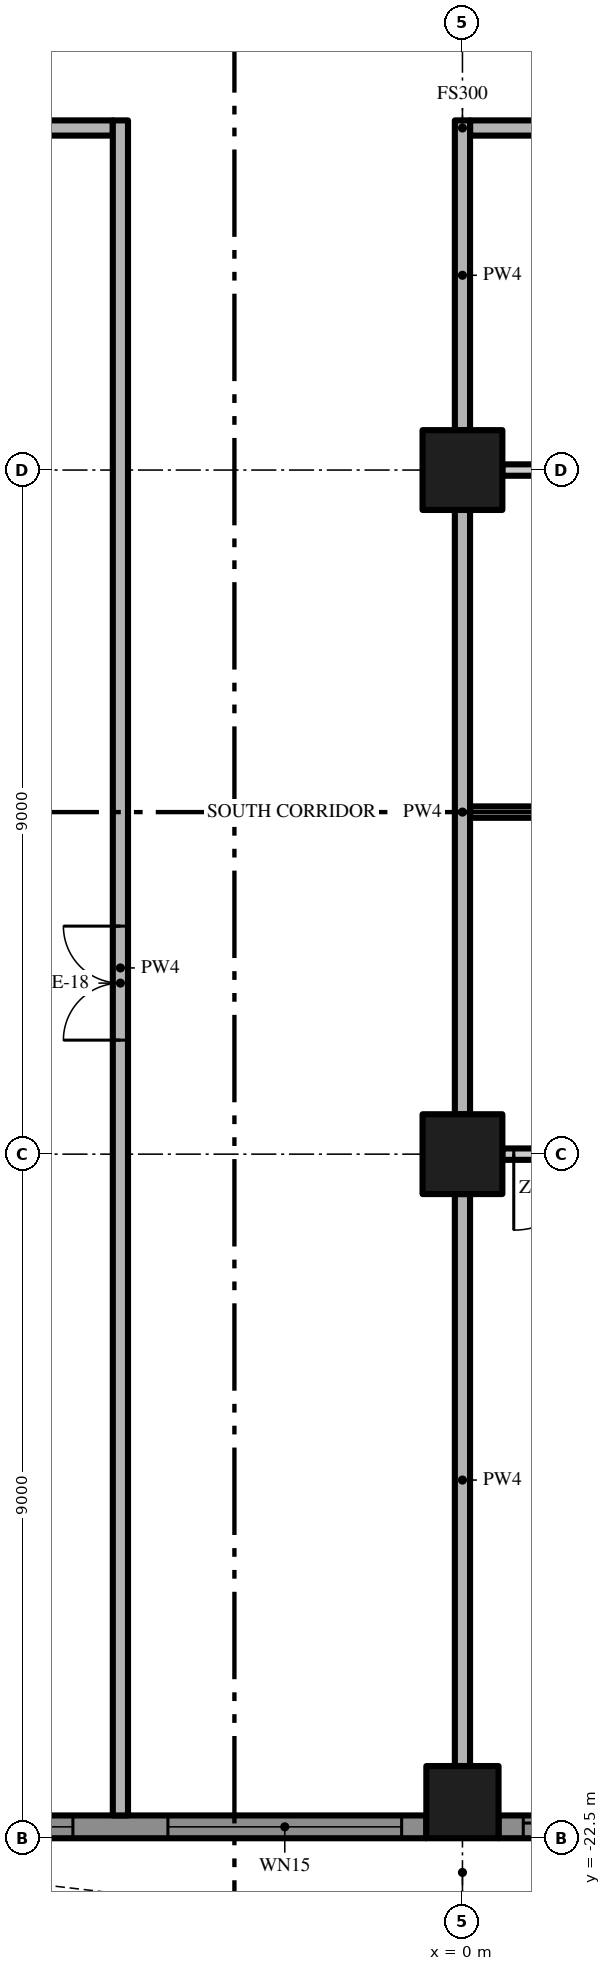
"""IFC4 building model, lengths in metres.
Left out: names, types, materials, properties, quantities, classifications, styles, units other than length and angle.
Written with IfcOpenShell. Run it as: python <this file> out.ifc"""

import sys

from ifc_helpers import new_model, si_unit, direction, frame, frame_2d, origin, origin_2d, place, context, subcontext, project, spatial, polyline, rectangle, outline, extrude, element, fill, save


model = new_model("IFC4")
c1 = context("Model", 3, precision=1e-05, world=origin(), true_north=direction((0.0, 1.0)))
c2 = subcontext(c1, "Body", "Model", "MODEL_VIEW")
j1 = project(units=[si_unit("LENGTHUNIT", "METRE"), si_unit("PLANEANGLEUNIT", "RADIAN")], contexts=[c1])
p1 = place(None, origin())
s1 = spatial("IfcSite", under=j1, at=p1, CompositionType="ELEMENT")
p2 = place(p1, origin())
s2 = spatial("IfcBuilding", under=s1, at=p2, CompositionType="ELEMENT")
p3 = place(p2, frame((0.0, 0.0, 230.0)))
s3 = spatial("IfcBuildingStorey", under=s2, at=p3, CompositionType="ELEMENT", Elevation=230.0)
p4 = place(p3, frame((0.0, -13.5, 0.0), z_axis=(0.0, 0.0, 1.0), x_axis=(1.0, 0.0, 0.0)))
e1 = element("IfcColumn", 1, at=p4, inside=s3, PredefinedType="COLUMN", context=c2, shape_type="SweptSolid", body=[
    extrude(rectangle(XDim=1.05, YDim=1.05, at=origin_2d()), origin(), (0.0, 0.0, 1.0), 3.5),
])
p5 = place(p3, frame((0.0, -22.025, 0.0), z_axis=(0.0, 0.0, 1.0), x_axis=(1.0, 0.0, 0.0)))
e2 = element("IfcColumn", 2, at=p5, inside=s3, PredefinedType="COLUMN", context=c2, shape_type="SweptSolid", body=[
    extrude(rectangle(XDim=0.95, YDim=0.95, at=origin_2d()), origin(), (0.0, 0.0, 1.0), 3.5),
])
p6 = place(p3, frame((0.0, -4.5, 0.0), z_axis=(0.0, 0.0, 1.0), x_axis=(1.0, 0.0, 0.0)))
e3 = element("IfcColumn", 3, at=p6, inside=s3, PredefinedType="COLUMN", context=c2, shape_type="SweptSolid", body=[
    extrude(rectangle(XDim=1.05, YDim=1.05, at=origin_2d()), origin(), (0.0, 0.0, 1.0), 3.5),
])
p7 = place(p3, frame((-0.475, -22.35, 0.0), z_axis=(0.0, 0.0, 1.0), x_axis=(-1.0, 0.0, 0.0)))
e4 = element("IfcWall", 4, at=p7, inside=s3, PredefinedType="SOLIDWALL", context=c2, shape_type="SweptSolid", body=[
    extrude(rectangle(XDim=8.05, YDim=0.3, at=frame_2d((4.025, 0.0))), origin(), (0.0, 0.0, 1.0), 3.5),
])
p8 = place(p7, frame((4.65, 0.0, 0.45)))
e5 = element("IfcOpeningElement", 5, at=p8, cuts=e4, PredefinedType="OPENING", context=c2, shape_type="SweptSolid", body=[
    extrude(rectangle(XDim=3.075, YDim=2.65, at=frame_2d((1.538, 1.325))), frame((0.0, 0.16, 0.0), z_axis=(0.0, -1.0, 0.0), x_axis=(1.0, 0.0, 0.0)), (0.0, 0.0, 1.0), 0.32),
])
p9 = place(p7, frame((0.325, 0.0, 0.45)))
e6 = element("IfcOpeningElement", 6, at=p9, cuts=e4, PredefinedType="OPENING", context=c2, shape_type="SweptSolid", body=[
    extrude(rectangle(XDim=3.075, YDim=2.65, at=frame_2d((1.538, 1.325))), frame((0.0, 0.16, 0.0), z_axis=(0.0, -1.0, 0.0), x_axis=(1.0, 0.0, 0.0)), (0.0, 0.0, 1.0), 0.32),
])
p10 = place(p3, frame((8.525, -22.35, 0.0), z_axis=(0.0, 0.0, 1.0), x_axis=(-1.0, 0.0, 0.0)))
e7 = element("IfcWall", 7, at=p10, inside=s3, PredefinedType="SOLIDWALL", context=c2, shape_type="SweptSolid", body=[
    extrude(rectangle(XDim=8.05, YDim=0.3, at=frame_2d((4.025, 0.0))), origin(), (0.0, 0.0, 1.0), 3.5),
])
p11 = place(p10, frame((4.65, 0.0, 0.0)))
e8 = element("IfcOpeningElement", 8, at=p11, cuts=e7, PredefinedType="OPENING", context=c2, shape_type="SweptSolid", body=[
    extrude(rectangle(XDim=3.075, YDim=2.4, at=frame_2d((1.538, 1.2))), frame((0.0, 0.16, 0.0), z_axis=(0.0, -1.0, 0.0), x_axis=(1.0, 0.0, 0.0)), (0.0, 0.0, 1.0), 0.32),
])
p12 = place(p10, frame((0.325, 0.0, 0.45)))
e9 = element("IfcOpeningElement", 9, at=p12, cuts=e7, PredefinedType="OPENING", context=c2, shape_type="SweptSolid", body=[
    extrude(rectangle(XDim=3.075, YDim=2.65, at=frame_2d((1.538, 1.325))), frame((0.0, 0.16, 0.0), z_axis=(0.0, -1.0, 0.0), x_axis=(1.0, 0.0, 0.0)), (0.0, 0.0, 1.0), 0.32),
])
p13 = place(p3, origin())
e10 = element("IfcWall", 10, at=p13, inside=s3, PredefinedType="USERDEFINED", context=c2, shape_type="SweptSolid", body=[
    extrude(outline(polyline([(-22.5, -23.451), (-21.0, -23.115), (-20.625, -23.1), (-19.5, -23.231), (-18.0, -23.755), (-16.5, -24.488), (-15.0, -25.149), (-13.5, -25.485), (-13.125, -25.5), (-12.0, -25.369), (-10.5, -24.845), (-9.0, -24.112), (-7.5, -23.451), (-6.0, -23.115), (-5.625, -23.1), (-4.5, -23.231), (-3.0, -23.755), (-1.5, -24.488), (0.0, -25.149), (1.5, -25.485), (1.875, -25.5), (3.0, -25.369), (4.5, -24.845), (6.0, -24.112), (7.5, -23.451), (9.0, -23.115), (9.375, -23.1), (10.5, -23.231), (12.0, -23.755), (13.5, -24.488), (15.0, -25.149), (16.5, -25.485), (16.875, -25.5), (18.0, -25.369), (19.5, -24.845), (21.0, -24.112), (22.5, -23.451), (22.399, -23.223), (20.895, -23.885), (19.404, -24.614), (17.944, -25.124), (16.865, -25.249), (16.533, -25.236), (15.079, -24.91), (13.605, -24.261), (12.096, -23.524), (10.556, -22.986), (9.385, -22.849), (8.967, -22.866), (7.421, -23.213), (5.895, -23.885), (4.404, -24.614), (2.944, -25.124), (1.865, -25.249), (1.533, -25.236), (0.079, -24.91), (-1.395, -24.261), (-2.904, -23.524), (-4.444, -22.986), (-5.615, -22.849), (-6.033, -22.866), (-7.579, -23.213), (-9.105, -23.885), (-10.596, -24.614), (-12.056, -25.124), (-13.135, -25.249), (-13.467, -25.236), (-14.921, -24.91), (-16.395, -24.261), (-17.904, -23.524), (-19.444, -22.986), (-20.615, -22.849), (-21.033, -22.866), (-22.555, -23.208), (-22.5, -23.451)])), origin(), (0.0, 0.0, 1.0), 0.9),
])
p14 = place(p3, frame((8.475, -13.5, 0.0), z_axis=(0.0, 0.0, 1.0), x_axis=(-1.0, 0.0, 0.0)))
e11 = element("IfcWall", 11, at=p14, inside=s3, PredefinedType="PARTITIONING", context=c2, shape_type="SweptSolid", body=[
    extrude(rectangle(XDim=7.95, YDim=0.15, at=frame_2d((3.975, 0.0))), origin(), (0.0, 0.0, 1.0), 3.5),
])
p15 = place(p14, frame((0.15, 0.0, 0.0)))
e12 = element("IfcOpeningElement", 12, at=p15, cuts=e11, PredefinedType="OPENING", context=c2, shape_type="SweptSolid", body=[
    extrude(rectangle(XDim=1.0, YDim=2.4, at=frame_2d((0.5, 1.2))), frame((0.0, 0.085, 0.0), z_axis=(0.0, -1.0, 0.0), x_axis=(1.0, 0.0, 0.0)), (0.0, 0.0, 1.0), 0.17),
])
p16 = place(p14, frame((6.8, 0.0, 0.0)))
e13 = element("IfcOpeningElement", 13, at=p16, cuts=e11, PredefinedType="OPENING", context=c2, shape_type="SweptSolid", body=[
    extrude(rectangle(XDim=1.0, YDim=2.4, at=frame_2d((0.5, 1.2))), frame((0.0, 0.085, 0.0), z_axis=(0.0, -1.0, 0.0), x_axis=(1.0, 0.0, 0.0)), (0.0, 0.0, 1.0), 0.17),
])
p17 = place(p3, frame((0.1, -9.0, 0.0), z_axis=(0.0, 0.0, 1.0), x_axis=(1.0, 0.0, 0.0)))
e14 = element("IfcWall", 14, at=p17, inside=s3, PredefinedType="PARTITIONING", context=c2, shape_type="SweptSolid", body=[
    extrude(rectangle(XDim=11.075, YDim=0.15, at=frame_2d((5.537, 0.0))), origin(), (0.0, 0.0, 1.0), 3.5),
])
p18 = place(p17, frame((6.8, 0.0, 0.0)))
e15 = element("IfcOpeningElement", 15, at=p18, cuts=e14, PredefinedType="OPENING", context=c2, shape_type="SweptSolid", body=[
    extrude(rectangle(XDim=0.8, YDim=2.0, at=frame_2d((0.4, 1.0))), frame((0.0, 0.085, 0.0), z_axis=(0.0, -1.0, 0.0), x_axis=(1.0, 0.0, 0.0)), (0.0, 0.0, 1.0), 0.17),
])
p19 = place(p3, frame((8.475, -4.5, 0.0), z_axis=(0.0, 0.0, 1.0), x_axis=(-1.0, 0.0, 0.0)))
e16 = element("IfcWall", 16, at=p19, inside=s3, PredefinedType="PARTITIONING", context=c2, shape_type="SweptSolid", body=[
    extrude(rectangle(XDim=7.95, YDim=0.15, at=frame_2d((3.975, 0.0))), origin(), (0.0, 0.0, 1.0), 3.5),
])
p20 = place(p19, frame((3.575, 0.0, 0.0)))
e17 = element("IfcOpeningElement", 17, at=p20, cuts=e16, PredefinedType="OPENING", context=c2, shape_type="SweptSolid", body=[
    extrude(rectangle(XDim=0.8, YDim=2.0, at=frame_2d((0.4, 1.0))), frame((0.0, 0.085, 0.0), z_axis=(0.0, -1.0, 0.0), x_axis=(1.0, 0.0, 0.0)), (0.0, 0.0, 1.0), 0.17),
])
p21 = place(p19, frame((6.55, 0.0, 0.0)))
e18 = element("IfcOpeningElement", 18, at=p21, cuts=e16, PredefinedType="OPENING", context=c2, shape_type="SweptSolid", body=[
    extrude(rectangle(XDim=0.9, YDim=2.1, at=frame_2d((0.45, 1.05))), frame((0.0, 0.085, 0.0), z_axis=(0.0, -1.0, 0.0), x_axis=(1.0, 0.0, 0.0)), (0.0, 0.0, 1.0), 0.17),
])
p22 = place(p3, frame((-17.4, 0.0, 0.0), z_axis=(0.0, 0.0, 1.0), x_axis=(1.0, 0.0, 0.0)))
e19 = element("IfcWall", 19, at=p22, inside=s3, PredefinedType="PARTITIONING", context=c2, shape_type="SweptSolid", body=[
    extrude(rectangle(XDim=12.8, YDim=0.2, at=frame_2d((6.4, 0.0))), origin(), (0.0, 0.0, 1.0), 3.5),
])
p23 = place(p3, frame((17.4, 0.0, 0.0), z_axis=(0.0, 0.0, 1.0), x_axis=(-1.0, 0.0, 0.0)))
e20 = element("IfcWall", 20, at=p23, inside=s3, PredefinedType="PARTITIONING", context=c2, shape_type="SweptSolid", body=[
    extrude(rectangle(XDim=17.3, YDim=0.2, at=frame_2d((8.65, 0.0))), origin(), (0.0, 0.0, 1.0), 3.5),
])
p24 = place(p23, frame((7.65, 0.0, 0.0)))
e21 = element("IfcOpeningElement", 21, at=p24, cuts=e20, PredefinedType="OPENING", context=c2, shape_type="SweptSolid", body=[
    extrude(rectangle(XDim=1.5, YDim=2.4, at=frame_2d((0.75, 1.2))), frame((0.0, 0.11, 0.0), z_axis=(0.0, -1.0, 0.0), x_axis=(1.0, 0.0, 0.0)), (0.0, 0.0, 1.0), 0.22),
])
p25 = place(p3, frame((-4.5, -22.2, 0.0), z_axis=(0.0, 0.0, 1.0), x_axis=(0.0, 1.0, 0.0)))
e22 = element("IfcWall", 22, at=p25, inside=s3, PredefinedType="PARTITIONING", context=c2, shape_type="SweptSolid", body=[
    extrude(rectangle(XDim=22.3, YDim=0.2, at=frame_2d((11.15, 0.0))), origin(), (0.0, 0.0, 1.0), 3.5),
])
p26 = place(p25, frame((10.2, 0.0, 0.0)))
e23 = element("IfcOpeningElement", 23, at=p26, cuts=e22, PredefinedType="OPENING", context=c2, shape_type="SweptSolid", body=[
    extrude(rectangle(XDim=1.5, YDim=2.4, at=frame_2d((0.75, 1.2))), frame((0.0, 0.11, 0.0), z_axis=(0.0, -1.0, 0.0), x_axis=(1.0, 0.0, 0.0)), (0.0, 0.0, 1.0), 0.22),
])
p27 = place(p3, frame((0.0, -21.55, 0.0), z_axis=(0.0, 0.0, 1.0), x_axis=(0.0, 1.0, 0.0)))
e24 = element("IfcWall", 24, at=p27, inside=s3, PredefinedType="PARTITIONING", context=c2, shape_type="SweptSolid", body=[
    extrude(rectangle(XDim=7.525, YDim=0.2, at=frame_2d((3.763, 0.0))), origin(), (0.0, 0.0, 1.0), 3.5),
])
p28 = place(p3, frame((0.0, -12.975, 0.0), z_axis=(0.0, 0.0, 1.0), x_axis=(0.0, 1.0, 0.0)))
e25 = element("IfcWall", 25, at=p28, inside=s3, PredefinedType="PARTITIONING", context=c2, shape_type="SweptSolid", body=[
    extrude(rectangle(XDim=7.95, YDim=0.2, at=frame_2d((3.975, 0.0))), origin(), (0.0, 0.0, 1.0), 3.5),
])
p29 = place(p3, frame((0.0, -3.975, 0.0), z_axis=(0.0, 0.0, 1.0), x_axis=(0.0, 1.0, 0.0)))
e26 = element("IfcWall", 26, at=p29, inside=s3, PredefinedType="PARTITIONING", context=c2, shape_type="SweptSolid", body=[
    extrude(rectangle(XDim=4.075, YDim=0.2, at=frame_2d((2.038, 0.0))), origin(), (0.0, 0.0, 1.0), 3.5),
])
p30 = place(p8, origin())
e27 = element("IfcWindow", 27, at=p30, inside=s3, PartitioningType="SINGLE_PANEL", PredefinedType="WINDOW", context=c2, shape_type="SweptSolid", body=[
    extrude(rectangle(XDim=3.075, YDim=2.65, at=frame_2d((1.538, 1.325))), frame((0.0, 0.03, 0.0), z_axis=(0.0, -1.0, 0.0), x_axis=(1.0, 0.0, 0.0)), (0.0, 0.0, 1.0), 0.06),
])
fill(e5, e27)
p31 = place(p9, origin())
e28 = element("IfcWindow", 28, at=p31, inside=s3, PartitioningType="SINGLE_PANEL", PredefinedType="WINDOW", context=c2, shape_type="SweptSolid", body=[
    extrude(rectangle(XDim=3.075, YDim=2.65, at=frame_2d((1.538, 1.325))), frame((0.0, 0.03, 0.0), z_axis=(0.0, -1.0, 0.0), x_axis=(1.0, 0.0, 0.0)), (0.0, 0.0, 1.0), 0.06),
])
fill(e6, e28)
p32 = place(p11, origin())
e29 = element("IfcDoor", 29, at=p32, inside=s3, OperationType="SINGLE_SWING_LEFT", PredefinedType="DOOR", context=c2, shape_type="SweptSolid", body=[
    extrude(rectangle(XDim=3.075, YDim=2.4, at=frame_2d((1.538, 1.2))), frame((0.0, 0.025, 0.0), z_axis=(0.0, -1.0, 0.0), x_axis=(1.0, 0.0, 0.0)), (0.0, 0.0, 1.0), 0.05),
])
fill(e8, e29)
p33 = place(p26, origin())
e30 = element("IfcDoor", 30, at=p33, inside=s3, OperationType="DOUBLE_DOOR_SINGLE_SWING", PredefinedType="DOOR", context=c2, shape_type="SweptSolid", body=[
    extrude(rectangle(XDim=1.5, YDim=2.4, at=frame_2d((0.75, 1.2))), frame((0.0, 0.025, 0.0), z_axis=(0.0, -1.0, 0.0), x_axis=(1.0, 0.0, 0.0)), (0.0, 0.0, 1.0), 0.05),
])
fill(e23, e30)
p34 = place(p16, origin())
e31 = element("IfcDoor", 31, at=p34, inside=s3, OperationType="SINGLE_SWING_RIGHT", PredefinedType="DOOR", context=c2, shape_type="SweptSolid", body=[
    extrude(rectangle(XDim=1.0, YDim=2.4, at=frame_2d((0.5, 1.2))), frame((0.0, 0.025, 0.0), z_axis=(0.0, -1.0, 0.0), x_axis=(1.0, 0.0, 0.0)), (0.0, 0.0, 1.0), 0.05),
])
fill(e13, e31)
save(model, sys.argv[1])
